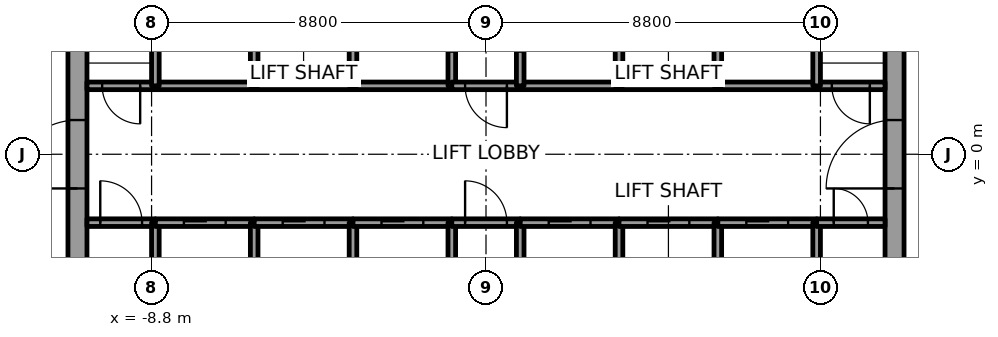
"""IFC4 building model, lengths in metres.
Left out: names, types, materials, properties, quantities, classifications, styles, units other than length and angle.
Written with IfcOpenShell. Run it as: python <this file> out.ifc"""

import sys

from ifc_helpers import new_model, si_unit, direction, frame, frame_2d, origin, place, context, subcontext, project, spatial, rectangle, extrude, element, fill, save


model = new_model("IFC4")
c1 = context("Model", 3, precision=1e-05, world=origin(), true_north=direction((0.0, 1.0)))
c2 = subcontext(c1, "Body", "Model", "MODEL_VIEW")
j1 = project(units=[si_unit("LENGTHUNIT", "METRE"), si_unit("PLANEANGLEUNIT", "RADIAN")], contexts=[c1])
p1 = place(None, origin())
s1 = spatial("IfcSite", under=j1, at=p1, CompositionType="ELEMENT")
p2 = place(p1, origin())
s2 = spatial("IfcBuilding", under=s1, at=p2, CompositionType="ELEMENT")
p3 = place(p2, frame((0.0, 0.0, 189.8)))
s3 = spatial("IfcBuildingStorey", under=s2, at=p3, CompositionType="ELEMENT", Elevation=189.8)
p4 = place(p3, frame((-10.75, -7.5, 0.0), z_axis=(0.0, 0.0, 1.0), x_axis=(0.0, 1.0, 0.0)))
e1 = element("IfcWall", 1, at=p4, inside=s3, PredefinedType="SHEAR", context=c2, shape_type="SweptSolid", body=[
    extrude(rectangle(XDim=15.0, YDim=0.5, at=frame_2d((7.5, 0.0))), origin(), (0.0, 0.0, 1.0), 4.0),
])
p5 = place(p4, frame((6.6, 0.0, 0.0)))
e2 = element("IfcOpeningElement", 2, at=p5, cuts=e1, PredefinedType="OPENING", context=c2, shape_type="SweptSolid", body=[
    extrude(rectangle(XDim=1.8, YDim=2.1, at=frame_2d((0.9, 1.05))), frame((0.0, 0.25, 0.0), z_axis=(0.0, -1.0, 0.0), x_axis=(1.0, 0.0, 0.0)), (0.0, 0.0, 1.0), 0.5),
])
p6 = place(p3, frame((10.75, -7.5, 0.0), z_axis=(0.0, 0.0, 1.0), x_axis=(0.0, 1.0, 0.0)))
e3 = element("IfcWall", 3, at=p6, inside=s3, PredefinedType="SHEAR", context=c2, shape_type="SweptSolid", body=[
    extrude(rectangle(XDim=15.0, YDim=0.5, at=frame_2d((7.5, 0.0))), origin(), (0.0, 0.0, 1.0), 4.0),
])
p7 = place(p6, frame((6.6, 0.0, 0.0)))
e4 = element("IfcOpeningElement", 4, at=p7, cuts=e3, PredefinedType="OPENING", context=c2, shape_type="SweptSolid", body=[
    extrude(rectangle(XDim=1.8, YDim=2.1, at=frame_2d((0.9, 1.05))), frame((0.0, 0.25, 0.0), z_axis=(0.0, -1.0, 0.0), x_axis=(1.0, 0.0, 0.0)), (0.0, 0.0, 1.0), 0.5),
])
p8 = place(p3, frame((-10.5, -1.8, 0.0), z_axis=(0.0, 0.0, 1.0), x_axis=(1.0, 0.0, 0.0)))
e5 = element("IfcWall", 5, at=p8, inside=s3, PredefinedType="SOLIDWALL", context=c2, shape_type="SweptSolid", body=[
    extrude(rectangle(XDim=1.8, YDim=0.2, at=frame_2d((0.9, 0.0))), origin(), (0.0, 0.0, 1.0), 3.85),
])
p9 = place(p8, frame((0.35, 0.0, 0.0)))
e6 = element("IfcOpeningElement", 6, at=p9, cuts=e5, PredefinedType="OPENING", context=c2, shape_type="SweptSolid", body=[
    extrude(rectangle(XDim=1.1, YDim=2.1, at=frame_2d((0.55, 1.05))), frame((0.0, 0.1, 0.0), z_axis=(0.0, -1.0, 0.0), x_axis=(1.0, 0.0, 0.0)), (0.0, 0.0, 1.0), 0.2),
])
p10 = place(p3, frame((-8.7, 1.8, 0.0), z_axis=(0.0, 0.0, 1.0), x_axis=(-1.0, 0.0, 0.0)))
e7 = element("IfcWall", 7, at=p10, inside=s3, PredefinedType="SOLIDWALL", context=c2, shape_type="SweptSolid", body=[
    extrude(rectangle(XDim=1.8, YDim=0.2, at=frame_2d((0.9, 0.0))), origin(), (0.0, 0.0, 1.0), 3.85),
])
p11 = place(p10, frame((0.4, 0.0, 0.0)))
e8 = element("IfcOpeningElement", 8, at=p11, cuts=e7, PredefinedType="OPENING", context=c2, shape_type="SweptSolid", body=[
    extrude(rectangle(XDim=1.0, YDim=2.1, at=frame_2d((0.5, 1.05))), frame((0.0, 0.1, 0.0), z_axis=(0.0, -1.0, 0.0), x_axis=(1.0, 0.0, 0.0)), (0.0, 0.0, 1.0), 0.2),
])
p12 = place(p3, frame((-8.7, -4.6, 0.0), z_axis=(0.0, 0.0, 1.0), x_axis=(0.0, 1.0, 0.0)))
e9 = element("IfcWall", 9, at=p12, inside=s3, PredefinedType="SOLIDWALL", context=c2, shape_type="SweptSolid", body=[
    extrude(rectangle(XDim=2.8, YDim=0.2, at=frame_2d((1.4, 0.0))), origin(), (0.0, 0.0, 1.0), 3.85),
])
p13 = place(p3, frame((-8.7, -1.8, 0.0), z_axis=(0.0, 0.0, 1.0), x_axis=(1.0, 0.0, 0.0)))
e10 = element("IfcWall", 10, at=p13, inside=s3, PredefinedType="SOLIDWALL", context=c2, shape_type="SweptSolid", body=[
    extrude(rectangle(XDim=2.6, YDim=0.2, at=frame_2d((1.3, 0.0))), origin(), (0.0, 0.0, 1.0), 3.85),
])
p14 = place(p13, frame((0.75, 0.0, 0.0)))
e11 = element("IfcOpeningElement", 11, at=p14, cuts=e10, PredefinedType="OPENING", context=c2, shape_type="SweptSolid", body=[
    extrude(rectangle(XDim=1.1, YDim=2.1, at=frame_2d((0.55, 1.05))), frame((0.0, 0.1, 0.0), z_axis=(0.0, -1.0, 0.0), x_axis=(1.0, 0.0, 0.0)), (0.0, 0.0, 1.0), 0.2),
])
p15 = place(p3, frame((-6.1, 1.8, 0.0), z_axis=(0.0, 0.0, 1.0), x_axis=(-1.0, 0.0, 0.0)))
e12 = element("IfcWall", 12, at=p15, inside=s3, PredefinedType="SOLIDWALL", context=c2, shape_type="SweptSolid", body=[
    extrude(rectangle(XDim=2.6, YDim=0.2, at=frame_2d((1.3, 0.0))), origin(), (0.0, 0.0, 1.0), 3.85),
])
for number, where, z_axis, x_axis in (
    (13, (-8.7, 1.8, 0.0), (0.0, 0.0, 1.0), (0.0, 1.0, 0.0)),
    (14, (-6.1, -4.6, 0.0), (0.0, 0.0, 1.0), (0.0, 1.0, 0.0)),
):
    element("IfcWall", number, at=place(p3, frame(where, z_axis=z_axis, x_axis=x_axis)), inside=s3, PredefinedType="SOLIDWALL", context=c2, shape_type="SweptSolid", body=[
        extrude(rectangle(XDim=2.8, YDim=0.2, at=frame_2d((1.4, 0.0))), origin(), (0.0, 0.0, 1.0), 3.85),
    ])
p16 = place(p3, frame((-6.1, -1.8, 0.0), z_axis=(0.0, 0.0, 1.0), x_axis=(1.0, 0.0, 0.0)))
e15 = element("IfcWall", 15, at=p16, inside=s3, PredefinedType="SOLIDWALL", context=c2, shape_type="SweptSolid", body=[
    extrude(rectangle(XDim=2.6, YDim=0.2, at=frame_2d((1.3, 0.0))), origin(), (0.0, 0.0, 1.0), 3.85),
])
p17 = place(p16, frame((0.75, 0.0, 0.0)))
e16 = element("IfcOpeningElement", 16, at=p17, cuts=e15, PredefinedType="OPENING", context=c2, shape_type="SweptSolid", body=[
    extrude(rectangle(XDim=1.1, YDim=2.1, at=frame_2d((0.55, 1.05))), frame((0.0, 0.1, 0.0), z_axis=(0.0, -1.0, 0.0), x_axis=(1.0, 0.0, 0.0)), (0.0, 0.0, 1.0), 0.2),
])
p18 = place(p3, frame((-3.5, 1.8, 0.0), z_axis=(0.0, 0.0, 1.0), x_axis=(-1.0, 0.0, 0.0)))
e17 = element("IfcWall", 17, at=p18, inside=s3, PredefinedType="SOLIDWALL", context=c2, shape_type="SweptSolid", body=[
    extrude(rectangle(XDim=2.6, YDim=0.2, at=frame_2d((1.3, 0.0))), origin(), (0.0, 0.0, 1.0), 3.85),
])
for number, where, z_axis, x_axis in (
    (18, (-6.1, 1.8, 0.0), (0.0, 0.0, 1.0), (0.0, 1.0, 0.0)),
    (19, (-3.5, -4.6, 0.0), (0.0, 0.0, 1.0), (0.0, 1.0, 0.0)),
):
    element("IfcWall", number, at=place(p3, frame(where, z_axis=z_axis, x_axis=x_axis)), inside=s3, PredefinedType="SOLIDWALL", context=c2, shape_type="SweptSolid", body=[
        extrude(rectangle(XDim=2.8, YDim=0.2, at=frame_2d((1.4, 0.0))), origin(), (0.0, 0.0, 1.0), 3.85),
    ])
p19 = place(p3, frame((-3.5, -1.8, 0.0), z_axis=(0.0, 0.0, 1.0), x_axis=(1.0, 0.0, 0.0)))
e20 = element("IfcWall", 20, at=p19, inside=s3, PredefinedType="SOLIDWALL", context=c2, shape_type="SweptSolid", body=[
    extrude(rectangle(XDim=2.6, YDim=0.2, at=frame_2d((1.3, 0.0))), origin(), (0.0, 0.0, 1.0), 3.85),
])
p20 = place(p19, frame((0.75, 0.0, 0.0)))
e21 = element("IfcOpeningElement", 21, at=p20, cuts=e20, PredefinedType="OPENING", context=c2, shape_type="SweptSolid", body=[
    extrude(rectangle(XDim=1.1, YDim=2.1, at=frame_2d((0.55, 1.05))), frame((0.0, 0.1, 0.0), z_axis=(0.0, -1.0, 0.0), x_axis=(1.0, 0.0, 0.0)), (0.0, 0.0, 1.0), 0.2),
])
p21 = place(p3, frame((-0.9, 1.8, 0.0), z_axis=(0.0, 0.0, 1.0), x_axis=(-1.0, 0.0, 0.0)))
e22 = element("IfcWall", 22, at=p21, inside=s3, PredefinedType="SOLIDWALL", context=c2, shape_type="SweptSolid", body=[
    extrude(rectangle(XDim=2.6, YDim=0.2, at=frame_2d((1.3, 0.0))), origin(), (0.0, 0.0, 1.0), 3.85),
])
p22 = place(p3, frame((-3.5, 4.6, 0.0), z_axis=(0.0, 0.0, 1.0), x_axis=(0.0, -1.0, 0.0)))
e23 = element("IfcWall", 23, at=p22, inside=s3, PredefinedType="SOLIDWALL", context=c2, shape_type="SweptSolid", body=[
    extrude(rectangle(XDim=2.8, YDim=0.2, at=frame_2d((1.4, 0.0))), origin(), (0.0, 0.0, 1.0), 3.85),
])
p23 = place(p3, frame((-0.9, 1.8, 0.0), z_axis=(0.0, 0.0, 1.0), x_axis=(0.0, 1.0, 0.0)))
e24 = element("IfcWall", 24, at=p23, inside=s3, PredefinedType="SOLIDWALL", context=c2, shape_type="SweptSolid", body=[
    extrude(rectangle(XDim=3.0, YDim=0.2, at=frame_2d((1.5, 0.0))), origin(), (0.0, 0.0, 1.0), 3.85),
])
p24 = place(p23, frame((0.9, 0.0, 0.0)))
e25 = element("IfcOpeningElement", 25, at=p24, cuts=e24, PredefinedType="OPENING", context=c2, shape_type="SweptSolid", body=[
    extrude(rectangle(XDim=1.2, YDim=2.1, at=frame_2d((0.6, 1.05))), frame((0.0, 0.1, 0.0), z_axis=(0.0, -1.0, 0.0), x_axis=(1.0, 0.0, 0.0)), (0.0, 0.0, 1.0), 0.2),
])
p25 = place(p3, frame((-0.9, -4.6, 0.0), z_axis=(0.0, 0.0, 1.0), x_axis=(0.0, 1.0, 0.0)))
e26 = element("IfcWall", 26, at=p25, inside=s3, PredefinedType="SOLIDWALL", context=c2, shape_type="SweptSolid", body=[
    extrude(rectangle(XDim=2.8, YDim=0.2, at=frame_2d((1.4, 0.0))), origin(), (0.0, 0.0, 1.0), 3.85),
])
p26 = place(p3, frame((-0.9, -1.8, 0.0), z_axis=(0.0, 0.0, 1.0), x_axis=(1.0, 0.0, 0.0)))
e27 = element("IfcWall", 27, at=p26, inside=s3, PredefinedType="SOLIDWALL", context=c2, shape_type="SweptSolid", body=[
    extrude(rectangle(XDim=1.8, YDim=0.2, at=frame_2d((0.9, 0.0))), origin(), (0.0, 0.0, 1.0), 3.85),
])
p27 = place(p26, frame((0.35, 0.0, 0.0)))
e28 = element("IfcOpeningElement", 28, at=p27, cuts=e27, PredefinedType="OPENING", context=c2, shape_type="SweptSolid", body=[
    extrude(rectangle(XDim=1.1, YDim=2.1, at=frame_2d((0.55, 1.05))), frame((0.0, 0.1, 0.0), z_axis=(0.0, -1.0, 0.0), x_axis=(1.0, 0.0, 0.0)), (0.0, 0.0, 1.0), 0.2),
])
p28 = place(p3, frame((0.9, 1.8, 0.0), z_axis=(0.0, 0.0, 1.0), x_axis=(-1.0, 0.0, 0.0)))
e29 = element("IfcWall", 29, at=p28, inside=s3, PredefinedType="SOLIDWALL", context=c2, shape_type="SweptSolid", body=[
    extrude(rectangle(XDim=1.8, YDim=0.2, at=frame_2d((0.9, 0.0))), origin(), (0.0, 0.0, 1.0), 3.85),
])
p29 = place(p28, frame((0.35, 0.0, 0.0)))
e30 = element("IfcOpeningElement", 30, at=p29, cuts=e29, PredefinedType="OPENING", context=c2, shape_type="SweptSolid", body=[
    extrude(rectangle(XDim=1.1, YDim=2.1, at=frame_2d((0.55, 1.05))), frame((0.0, 0.1, 0.0), z_axis=(0.0, -1.0, 0.0), x_axis=(1.0, 0.0, 0.0)), (0.0, 0.0, 1.0), 0.2),
])
p30 = place(p3, frame((0.9, -1.8, 0.0), z_axis=(0.0, 0.0, 1.0), x_axis=(0.0, -1.0, 0.0)))
e31 = element("IfcWall", 31, at=p30, inside=s3, PredefinedType="SOLIDWALL", context=c2, shape_type="SweptSolid", body=[
    extrude(rectangle(XDim=2.8, YDim=0.2, at=frame_2d((1.4, 0.0))), origin(), (0.0, 0.0, 1.0), 3.85),
])
p31 = place(p3, frame((0.9, -1.8, 0.0), z_axis=(0.0, 0.0, 1.0), x_axis=(1.0, 0.0, 0.0)))
e32 = element("IfcWall", 32, at=p31, inside=s3, PredefinedType="SOLIDWALL", context=c2, shape_type="SweptSolid", body=[
    extrude(rectangle(XDim=2.6, YDim=0.2, at=frame_2d((1.3, 0.0))), origin(), (0.0, 0.0, 1.0), 3.85),
])
p32 = place(p31, frame((0.75, 0.0, 0.0)))
e33 = element("IfcOpeningElement", 33, at=p32, cuts=e32, PredefinedType="OPENING", context=c2, shape_type="SweptSolid", body=[
    extrude(rectangle(XDim=1.1, YDim=2.1, at=frame_2d((0.55, 1.05))), frame((0.0, 0.1, 0.0), z_axis=(0.0, -1.0, 0.0), x_axis=(1.0, 0.0, 0.0)), (0.0, 0.0, 1.0), 0.2),
])
p33 = place(p3, frame((3.5, 1.8, 0.0), z_axis=(0.0, 0.0, 1.0), x_axis=(-1.0, 0.0, 0.0)))
e34 = element("IfcWall", 34, at=p33, inside=s3, PredefinedType="SOLIDWALL", context=c2, shape_type="SweptSolid", body=[
    extrude(rectangle(XDim=2.6, YDim=0.2, at=frame_2d((1.3, 0.0))), origin(), (0.0, 0.0, 1.0), 3.85),
])
p34 = place(p3, frame((0.9, 4.8, 0.0), z_axis=(0.0, 0.0, 1.0), x_axis=(0.0, -1.0, 0.0)))
e35 = element("IfcWall", 35, at=p34, inside=s3, PredefinedType="SOLIDWALL", context=c2, shape_type="SweptSolid", body=[
    extrude(rectangle(XDim=3.0, YDim=0.2, at=frame_2d((1.5, 0.0))), origin(), (0.0, 0.0, 1.0), 3.85),
])
p35 = place(p34, frame((0.9, 0.0, 0.0)))
e36 = element("IfcOpeningElement", 36, at=p35, cuts=e35, PredefinedType="OPENING", context=c2, shape_type="SweptSolid", body=[
    extrude(rectangle(XDim=1.2, YDim=2.1, at=frame_2d((0.6, 1.05))), frame((0.0, 0.1, 0.0), z_axis=(0.0, -1.0, 0.0), x_axis=(1.0, 0.0, 0.0)), (0.0, 0.0, 1.0), 0.2),
])
p36 = place(p3, frame((3.5, -4.6, 0.0), z_axis=(0.0, 0.0, 1.0), x_axis=(0.0, 1.0, 0.0)))
e37 = element("IfcWall", 37, at=p36, inside=s3, PredefinedType="SOLIDWALL", context=c2, shape_type="SweptSolid", body=[
    extrude(rectangle(XDim=2.8, YDim=0.2, at=frame_2d((1.4, 0.0))), origin(), (0.0, 0.0, 1.0), 3.85),
])
p37 = place(p3, frame((3.5, -1.8, 0.0), z_axis=(0.0, 0.0, 1.0), x_axis=(1.0, 0.0, 0.0)))
e38 = element("IfcWall", 38, at=p37, inside=s3, PredefinedType="SOLIDWALL", context=c2, shape_type="SweptSolid", body=[
    extrude(rectangle(XDim=2.6, YDim=0.2, at=frame_2d((1.3, 0.0))), origin(), (0.0, 0.0, 1.0), 3.85),
])
p38 = place(p37, frame((0.75, 0.0, 0.0)))
e39 = element("IfcOpeningElement", 39, at=p38, cuts=e38, PredefinedType="OPENING", context=c2, shape_type="SweptSolid", body=[
    extrude(rectangle(XDim=1.1, YDim=2.1, at=frame_2d((0.55, 1.05))), frame((0.0, 0.1, 0.0), z_axis=(0.0, -1.0, 0.0), x_axis=(1.0, 0.0, 0.0)), (0.0, 0.0, 1.0), 0.2),
])
p39 = place(p3, frame((6.1, 1.8, 0.0), z_axis=(0.0, 0.0, 1.0), x_axis=(-1.0, 0.0, 0.0)))
e40 = element("IfcWall", 40, at=p39, inside=s3, PredefinedType="SOLIDWALL", context=c2, shape_type="SweptSolid", body=[
    extrude(rectangle(XDim=2.6, YDim=0.2, at=frame_2d((1.3, 0.0))), origin(), (0.0, 0.0, 1.0), 3.85),
])
for number, where, z_axis, x_axis in (
    (41, (3.5, 1.8, 0.0), (0.0, 0.0, 1.0), (0.0, 1.0, 0.0)),
    (42, (6.1, -4.6, 0.0), (0.0, 0.0, 1.0), (0.0, 1.0, 0.0)),
):
    element("IfcWall", number, at=place(p3, frame(where, z_axis=z_axis, x_axis=x_axis)), inside=s3, PredefinedType="SOLIDWALL", context=c2, shape_type="SweptSolid", body=[
        extrude(rectangle(XDim=2.8, YDim=0.2, at=frame_2d((1.4, 0.0))), origin(), (0.0, 0.0, 1.0), 3.85),
    ])
p40 = place(p3, frame((6.1, -1.8, 0.0), z_axis=(0.0, 0.0, 1.0), x_axis=(1.0, 0.0, 0.0)))
e43 = element("IfcWall", 43, at=p40, inside=s3, PredefinedType="SOLIDWALL", context=c2, shape_type="SweptSolid", body=[
    extrude(rectangle(XDim=2.6, YDim=0.2, at=frame_2d((1.3, 0.0))), origin(), (0.0, 0.0, 1.0), 3.85),
])
p41 = place(p40, frame((0.75, 0.0, 0.0)))
e44 = element("IfcOpeningElement", 44, at=p41, cuts=e43, PredefinedType="OPENING", context=c2, shape_type="SweptSolid", body=[
    extrude(rectangle(XDim=1.1, YDim=2.1, at=frame_2d((0.55, 1.05))), frame((0.0, 0.1, 0.0), z_axis=(0.0, -1.0, 0.0), x_axis=(1.0, 0.0, 0.0)), (0.0, 0.0, 1.0), 0.2),
])
p42 = place(p3, frame((8.7, 1.8, 0.0), z_axis=(0.0, 0.0, 1.0), x_axis=(-1.0, 0.0, 0.0)))
e45 = element("IfcWall", 45, at=p42, inside=s3, PredefinedType="SOLIDWALL", context=c2, shape_type="SweptSolid", body=[
    extrude(rectangle(XDim=2.6, YDim=0.2, at=frame_2d((1.3, 0.0))), origin(), (0.0, 0.0, 1.0), 3.85),
])
for number, where, z_axis, x_axis in (
    (46, (6.1, 1.8, 0.0), (0.0, 0.0, 1.0), (0.0, 1.0, 0.0)),
    (47, (8.7, -1.8, 0.0), (0.0, 0.0, 1.0), (0.0, -1.0, 0.0)),
):
    element("IfcWall", number, at=place(p3, frame(where, z_axis=z_axis, x_axis=x_axis)), inside=s3, PredefinedType="SOLIDWALL", context=c2, shape_type="SweptSolid", body=[
        extrude(rectangle(XDim=2.8, YDim=0.2, at=frame_2d((1.4, 0.0))), origin(), (0.0, 0.0, 1.0), 3.85),
    ])
p43 = place(p3, frame((8.7, -1.8, 0.0), z_axis=(0.0, 0.0, 1.0), x_axis=(1.0, 0.0, 0.0)))
e48 = element("IfcWall", 48, at=p43, inside=s3, PredefinedType="SOLIDWALL", context=c2, shape_type="SweptSolid", body=[
    extrude(rectangle(XDim=1.8, YDim=0.2, at=frame_2d((0.9, 0.0))), origin(), (0.0, 0.0, 1.0), 3.85),
])
p44 = place(p43, frame((0.45, 0.0, 0.0)))
e49 = element("IfcOpeningElement", 49, at=p44, cuts=e48, PredefinedType="OPENING", context=c2, shape_type="SweptSolid", body=[
    extrude(rectangle(XDim=0.9, YDim=2.1, at=frame_2d((0.45, 1.05))), frame((0.0, 0.1, 0.0), z_axis=(0.0, -1.0, 0.0), x_axis=(1.0, 0.0, 0.0)), (0.0, 0.0, 1.0), 0.2),
])
p45 = place(p3, frame((10.5, 1.8, 0.0), z_axis=(0.0, 0.0, 1.0), x_axis=(-1.0, 0.0, 0.0)))
e50 = element("IfcWall", 50, at=p45, inside=s3, PredefinedType="SOLIDWALL", context=c2, shape_type="SweptSolid", body=[
    extrude(rectangle(XDim=1.8, YDim=0.2, at=frame_2d((0.9, 0.0))), origin(), (0.0, 0.0, 1.0), 3.85),
])
p46 = place(p45, frame((0.4, 0.0, 0.0)))
e51 = element("IfcOpeningElement", 51, at=p46, cuts=e50, PredefinedType="OPENING", context=c2, shape_type="SweptSolid", body=[
    extrude(rectangle(XDim=1.0, YDim=2.1, at=frame_2d((0.5, 1.05))), frame((0.0, 0.1, 0.0), z_axis=(0.0, -1.0, 0.0), x_axis=(1.0, 0.0, 0.0)), (0.0, 0.0, 1.0), 0.2),
])
p47 = place(p3, frame((8.7, 4.6, 0.0), z_axis=(0.0, 0.0, 1.0), x_axis=(0.0, -1.0, 0.0)))
e52 = element("IfcWall", 52, at=p47, inside=s3, PredefinedType="SOLIDWALL", context=c2, shape_type="SweptSolid", body=[
    extrude(rectangle(XDim=2.8, YDim=0.2, at=frame_2d((1.4, 0.0))), origin(), (0.0, 0.0, 1.0), 3.85),
])
p48 = place(p14, origin())
e53 = element("IfcDoor", 53, at=p48, inside=s3, OperationType="SLIDING_TO_LEFT", PredefinedType="DOOR", context=c2, shape_type="SweptSolid", body=[
    extrude(rectangle(XDim=1.1, YDim=2.1, at=frame_2d((0.55, 1.05))), frame((0.0, 0.025, 0.0), z_axis=(0.0, -1.0, 0.0), x_axis=(1.0, 0.0, 0.0)), (0.0, 0.0, 1.0), 0.05),
])
fill(e11, e53)
p49 = place(p17, origin())
e54 = element("IfcDoor", 54, at=p49, inside=s3, OperationType="SLIDING_TO_RIGHT", PredefinedType="DOOR", context=c2, shape_type="SweptSolid", body=[
    extrude(rectangle(XDim=1.1, YDim=2.1, at=frame_2d((0.55, 1.05))), frame((0.0, 0.025, 0.0), z_axis=(0.0, -1.0, 0.0), x_axis=(1.0, 0.0, 0.0)), (0.0, 0.0, 1.0), 0.05),
])
fill(e16, e54)
p50 = place(p20, origin())
e55 = element("IfcDoor", 55, at=p50, inside=s3, OperationType="SLIDING_TO_RIGHT", PredefinedType="DOOR", context=c2, shape_type="SweptSolid", body=[
    extrude(rectangle(XDim=1.1, YDim=2.1, at=frame_2d((0.55, 1.05))), frame((0.0, 0.025, 0.0), z_axis=(0.0, -1.0, 0.0), x_axis=(1.0, 0.0, 0.0)), (0.0, 0.0, 1.0), 0.05),
])
fill(e21, e55)
p51 = place(p32, origin())
e56 = element("IfcDoor", 56, at=p51, inside=s3, OperationType="SLIDING_TO_LEFT", PredefinedType="DOOR", context=c2, shape_type="SweptSolid", body=[
    extrude(rectangle(XDim=1.1, YDim=2.1, at=frame_2d((0.55, 1.05))), frame((0.0, 0.025, 0.0), z_axis=(0.0, -1.0, 0.0), x_axis=(1.0, 0.0, 0.0)), (0.0, 0.0, 1.0), 0.05),
])
fill(e33, e56)
p52 = place(p38, origin())
e57 = element("IfcDoor", 57, at=p52, inside=s3, OperationType="SLIDING_TO_LEFT", PredefinedType="DOOR", context=c2, shape_type="SweptSolid", body=[
    extrude(rectangle(XDim=1.1, YDim=2.1, at=frame_2d((0.55, 1.05))), frame((0.0, 0.025, 0.0), z_axis=(0.0, -1.0, 0.0), x_axis=(1.0, 0.0, 0.0)), (0.0, 0.0, 1.0), 0.05),
])
fill(e39, e57)
p53 = place(p41, origin())
e58 = element("IfcDoor", 58, at=p53, inside=s3, OperationType="SLIDING_TO_RIGHT", PredefinedType="DOOR", context=c2, shape_type="SweptSolid", body=[
    extrude(rectangle(XDim=1.1, YDim=2.1, at=frame_2d((0.55, 1.05))), frame((0.0, 0.025, 0.0), z_axis=(0.0, -1.0, 0.0), x_axis=(1.0, 0.0, 0.0)), (0.0, 0.0, 1.0), 0.05),
])
fill(e44, e58)
p54 = place(p9, origin())
e59 = element("IfcDoor", 59, at=p54, inside=s3, OperationType="SINGLE_SWING_RIGHT", PredefinedType="DOOR", context=c2, shape_type="SweptSolid", body=[
    extrude(rectangle(XDim=1.1, YDim=2.1, at=frame_2d((0.55, 1.05))), frame((0.0, 0.025, 0.0), z_axis=(0.0, -1.0, 0.0), x_axis=(1.0, 0.0, 0.0)), (0.0, 0.0, 1.0), 0.05),
])
fill(e6, e59)
p55 = place(p29, origin())
e60 = element("IfcDoor", 60, at=p55, inside=s3, OperationType="SINGLE_SWING_LEFT", PredefinedType="DOOR", context=c2, shape_type="SweptSolid", body=[
    extrude(rectangle(XDim=1.1, YDim=2.1, at=frame_2d((0.55, 1.05))), frame((0.0, 0.025, 0.0), z_axis=(0.0, -1.0, 0.0), x_axis=(1.0, 0.0, 0.0)), (0.0, 0.0, 1.0), 0.05),
])
fill(e30, e60)
p56 = place(p27, origin())
e61 = element("IfcDoor", 61, at=p56, inside=s3, OperationType="SINGLE_SWING_RIGHT", PredefinedType="DOOR", context=c2, shape_type="SweptSolid", body=[
    extrude(rectangle(XDim=1.1, YDim=2.1, at=frame_2d((0.55, 1.05))), frame((0.0, 0.025, 0.0), z_axis=(0.0, -1.0, 0.0), x_axis=(1.0, 0.0, 0.0)), (0.0, 0.0, 1.0), 0.05),
])
fill(e28, e61)
p57 = place(p11, origin())
e62 = element("IfcDoor", 62, at=p57, inside=s3, OperationType="SINGLE_SWING_LEFT", PredefinedType="DOOR", context=c2, shape_type="SweptSolid", body=[
    extrude(rectangle(XDim=1.0, YDim=2.1, at=frame_2d((0.5, 1.05))), frame((0.0, 0.025, 0.0), z_axis=(0.0, -1.0, 0.0), x_axis=(1.0, 0.0, 0.0)), (0.0, 0.0, 1.0), 0.05),
])
fill(e8, e62)
p58 = place(p46, origin())
e63 = element("IfcDoor", 63, at=p58, inside=s3, OperationType="SINGLE_SWING_LEFT", PredefinedType="DOOR", context=c2, shape_type="SweptSolid", body=[
    extrude(rectangle(XDim=1.0, YDim=2.1, at=frame_2d((0.5, 1.05))), frame((0.0, 0.025, 0.0), z_axis=(0.0, -1.0, 0.0), x_axis=(1.0, 0.0, 0.0)), (0.0, 0.0, 1.0), 0.05),
])
fill(e51, e63)
p59 = place(p44, origin())
e64 = element("IfcDoor", 64, at=p59, inside=s3, OperationType="SINGLE_SWING_LEFT", PredefinedType="DOOR", context=c2, shape_type="SweptSolid", body=[
    extrude(rectangle(XDim=0.9, YDim=2.1, at=frame_2d((0.45, 1.05))), frame((0.0, 0.025, 0.0), z_axis=(0.0, -1.0, 0.0), x_axis=(1.0, 0.0, 0.0)), (0.0, 0.0, 1.0), 0.05),
])
fill(e49, e64)
p60 = place(p5, origin())
e65 = element("IfcDoor", 65, at=p60, inside=s3, OperationType="DOUBLE_DOOR_SINGLE_SWING", PredefinedType="DOOR", context=c2, shape_type="SweptSolid", body=[
    extrude(rectangle(XDim=1.8, YDim=2.1, at=frame_2d((0.9, 1.05))), frame((0.0, 0.025, 0.0), z_axis=(0.0, -1.0, 0.0), x_axis=(1.0, 0.0, 0.0)), (0.0, 0.0, 1.0), 0.05),
])
fill(e2, e65)
p61 = place(p7, origin())
e66 = element("IfcDoor", 66, at=p61, inside=s3, OperationType="DOUBLE_DOOR_SINGLE_SWING", PredefinedType="DOOR", context=c2, shape_type="SweptSolid", body=[
    extrude(rectangle(XDim=1.8, YDim=2.1, at=frame_2d((0.9, 1.05))), frame((0.0, 0.025, 0.0), z_axis=(0.0, -1.0, 0.0), x_axis=(1.0, 0.0, 0.0)), (0.0, 0.0, 1.0), 0.05),
])
fill(e4, e66)
save(model, sys.argv[1])
